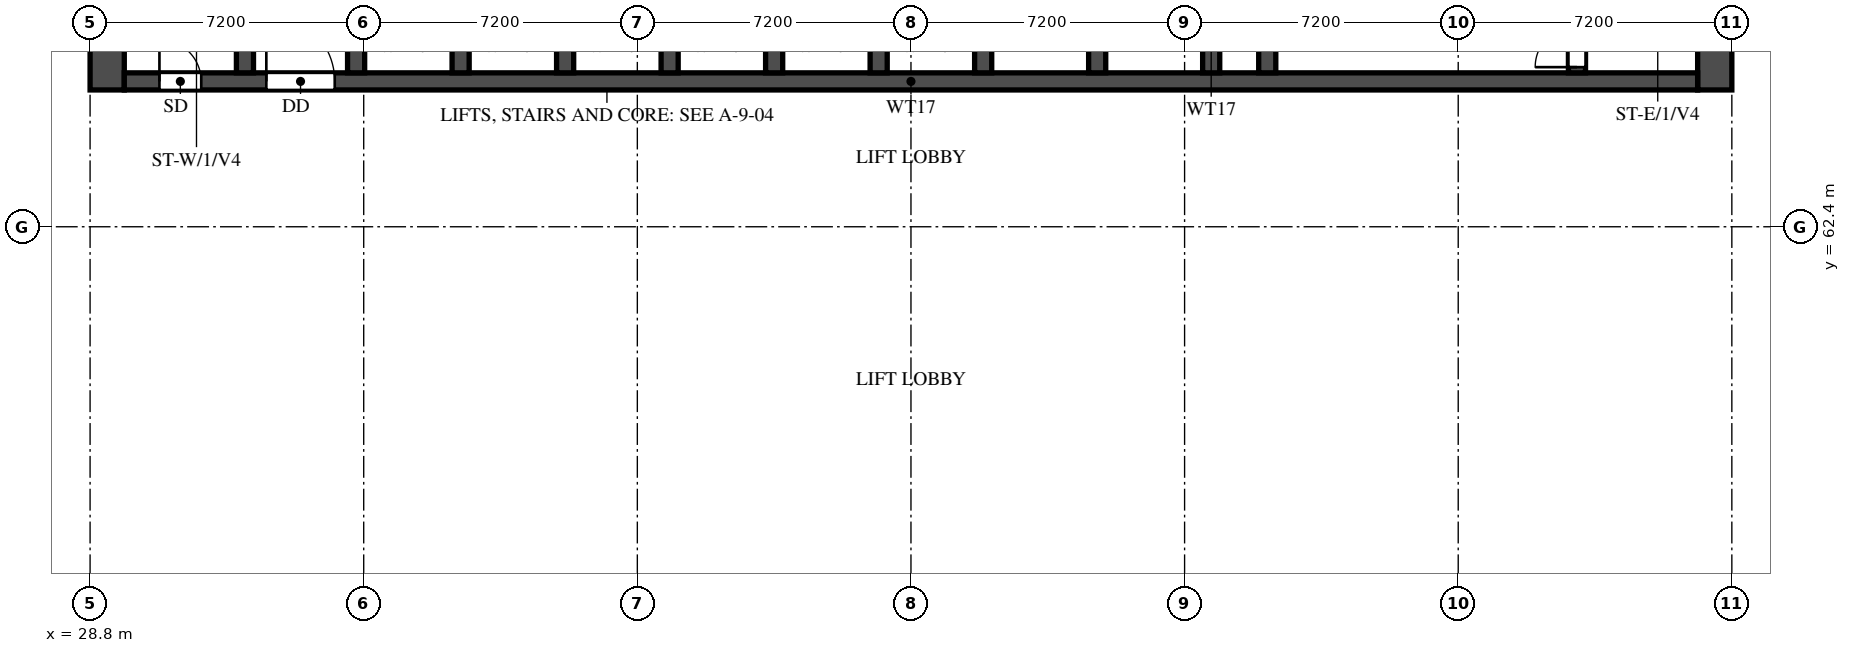
"""IFC4 building model, lengths in metres.
Left out: names, types, materials, properties, quantities, classifications, styles, units other than length and angle.
Written with IfcOpenShell. Run it as: python <this file> out.ifc"""

import sys

from ifc_helpers import new_model, si_unit, direction, frame, frame_2d, origin, place, context, subcontext, project, spatial, rectangle, extrude, element, fill, save


model = new_model("IFC4")
c1 = context("Model", 3, precision=1e-05, world=origin(), true_north=direction((0.0, 1.0)))
c2 = subcontext(c1, "Body", "Model", "MODEL_VIEW")
j1 = project(units=[si_unit("LENGTHUNIT", "METRE"), si_unit("PLANEANGLEUNIT", "RADIAN")], contexts=[c1])
p1 = place(None, origin())
s1 = spatial("IfcSite", under=j1, at=p1, CompositionType="ELEMENT")
p2 = place(p1, origin())
s2 = spatial("IfcBuilding", under=s1, at=p2, CompositionType="ELEMENT")
p3 = place(p2, frame((0.0, 0.0, 13.2)))
s3 = spatial("IfcBuildingStorey", under=s2, at=p3, CompositionType="ELEMENT", Elevation=13.2)
for number, where, z_axis, x_axis in (
    (1, (29.25, 66.0, 0.0), (0.0, 0.0, 1.0), (0.0, 1.0, 0.0)),
    (2, (71.55, 66.0, 0.0), (0.0, 0.0, 1.0), (0.0, 1.0, 0.0)),
):
    element("IfcWall", number, at=place(p3, frame(where, z_axis=z_axis, x_axis=x_axis)), inside=s3, PredefinedType="SHEAR", context=c2, shape_type="SweptSolid", body=[
        extrude(rectangle(XDim=12.0, YDim=0.9, at=frame_2d((6.0, 0.0))), origin(), (0.0, 0.0, 1.0), 3.8),
    ])
p4 = place(p3, frame((29.7, 66.225, 0.0), z_axis=(0.0, 0.0, 1.0), x_axis=(1.0, 0.0, 0.0)))
e3 = element("IfcWall", 3, at=p4, inside=s3, PredefinedType="SHEAR", context=c2, shape_type="SweptSolid", body=[
    extrude(rectangle(XDim=41.4, YDim=0.45, at=frame_2d((20.7, 0.0))), origin(), (0.0, 0.0, 1.0), 3.8),
])
p5 = place(p4, frame((0.925, 0.0, 0.0)))
e4 = element("IfcOpeningElement", 4, at=p5, cuts=e3, PredefinedType="OPENING", context=c2, shape_type="SweptSolid", body=[
    extrude(rectangle(XDim=1.1, YDim=2.1, at=frame_2d((0.55, 1.05))), frame((0.0, 0.235, 0.0), z_axis=(0.0, -1.0, 0.0), x_axis=(1.0, 0.0, 0.0)), (0.0, 0.0, 1.0), 0.47),
])
p6 = place(p4, frame((3.738, 0.0, 0.0)))
e5 = element("IfcOpeningElement", 5, at=p6, cuts=e3, PredefinedType="OPENING", context=c2, shape_type="SweptSolid", body=[
    extrude(rectangle(XDim=1.8, YDim=2.1, at=frame_2d((0.9, 1.05))), frame((0.0, 0.235, 0.0), z_axis=(0.0, -1.0, 0.0), x_axis=(1.0, 0.0, 0.0)), (0.0, 0.0, 1.0), 0.47),
])
p7 = place(p3, frame((32.875, 66.45, 0.0), z_axis=(0.0, 0.0, 1.0), x_axis=(0.0, 1.0, 0.0)))
e6 = element("IfcWall", 6, at=p7, inside=s3, PredefinedType="SHEAR", context=c2, shape_type="SweptSolid", body=[
    extrude(rectangle(XDim=10.65, YDim=0.45, at=frame_2d((5.325, 0.0))), origin(), (0.0, 0.0, 1.0), 3.8),
])
p8 = place(p3, frame((67.925, 66.45, 0.0), z_axis=(0.0, 0.0, 1.0), x_axis=(0.0, 1.0, 0.0)))
e7 = element("IfcWall", 7, at=p8, inside=s3, PredefinedType="SHEAR", context=c2, shape_type="SweptSolid", body=[
    extrude(rectangle(XDim=10.65, YDim=0.45, at=frame_2d((5.325, 0.0))), origin(), (0.0, 0.0, 1.0), 3.8),
])
p9 = place(p8, frame((0.15, 0.0, 0.0)))
e8 = element("IfcOpeningElement", 8, at=p9, cuts=e7, PredefinedType="OPENING", context=c2, shape_type="SweptSolid", body=[
    extrude(rectangle(XDim=1.1, YDim=2.1, at=frame_2d((0.55, 1.05))), frame((0.0, 0.235, 0.0), z_axis=(0.0, -1.0, 0.0), x_axis=(1.0, 0.0, 0.0)), (0.0, 0.0, 1.0), 0.47),
])
p10 = place(p3, frame((59.775, 66.45, 0.0), z_axis=(0.0, 0.0, 1.0), x_axis=(0.0, 1.0, 0.0)))
e9 = element("IfcWall", 9, at=p10, inside=s3, PredefinedType="SHEAR", context=c2, shape_type="SweptSolid", body=[
    extrude(rectangle(XDim=6.025, YDim=0.45, at=frame_2d((3.013, 0.0))), origin(), (0.0, 0.0, 1.0), 3.8),
])
p11 = place(p10, frame((3.85, 0.0, 0.0)))
e10 = element("IfcOpeningElement", 10, at=p11, cuts=e9, PredefinedType="OPENING", context=c2, shape_type="SweptSolid", body=[
    extrude(rectangle(XDim=1.2, YDim=2.1, at=frame_2d((0.6, 1.05))), frame((0.0, 0.235, 0.0), z_axis=(0.0, -1.0, 0.0), x_axis=(1.0, 0.0, 0.0)), (0.0, 0.0, 1.0), 0.47),
])
for number, where, z_axis, x_axis in (
    (11, (35.8, 66.45, 0.0), (0.0, 0.0, 1.0), (0.0, 1.0, 0.0)),
    (12, (38.55, 66.45, 0.0), (0.0, 0.0, 1.0), (0.0, 1.0, 0.0)),
    (13, (41.3, 66.45, 0.0), (0.0, 0.0, 1.0), (0.0, 1.0, 0.0)),
    (14, (44.05, 66.45, 0.0), (0.0, 0.0, 1.0), (0.0, 1.0, 0.0)),
    (15, (46.8, 66.45, 0.0), (0.0, 0.0, 1.0), (0.0, 1.0, 0.0)),
    (16, (49.55, 66.45, 0.0), (0.0, 0.0, 1.0), (0.0, 1.0, 0.0)),
    (17, (52.3, 66.45, 0.0), (0.0, 0.0, 1.0), (0.0, 1.0, 0.0)),
    (18, (55.3, 66.45, 0.0), (0.0, 0.0, 1.0), (0.0, 1.0, 0.0)),
    (19, (58.3, 66.45, 0.0), (0.0, 0.0, 1.0), (0.0, 1.0, 0.0)),
):
    element("IfcWall", number, at=place(p3, frame(where, z_axis=z_axis, x_axis=x_axis)), inside=s3, PredefinedType="SHEAR", context=c2, shape_type="SweptSolid", body=[
        extrude(rectangle(XDim=2.425, YDim=0.45, at=frame_2d((1.212, 0.0))), origin(), (0.0, 0.0, 1.0), 3.8),
    ])
p12 = place(p5, origin())
e20 = element("IfcDoor", 20, at=p12, inside=s3, OperationType="SINGLE_SWING_LEFT", PredefinedType="DOOR", context=c2, shape_type="SweptSolid", body=[
    extrude(rectangle(XDim=1.1, YDim=2.1, at=frame_2d((0.55, 1.05))), frame((0.0, 0.025, 0.0), z_axis=(0.0, -1.0, 0.0), x_axis=(1.0, 0.0, 0.0)), (0.0, 0.0, 1.0), 0.05),
])
fill(e4, e20)
p13 = place(p9, origin())
e21 = element("IfcDoor", 21, at=p13, inside=s3, OperationType="SINGLE_SWING_LEFT", PredefinedType="DOOR", context=c2, shape_type="SweptSolid", body=[
    extrude(rectangle(XDim=1.1, YDim=2.1, at=frame_2d((0.55, 1.05))), frame((0.0, 0.025, 0.0), z_axis=(0.0, -1.0, 0.0), x_axis=(1.0, 0.0, 0.0)), (0.0, 0.0, 1.0), 0.05),
])
fill(e8, e21)
p14 = place(p6, origin())
e22 = element("IfcDoor", 22, at=p14, inside=s3, OperationType="DOUBLE_DOOR_SINGLE_SWING", PredefinedType="DOOR", context=c2, shape_type="SweptSolid", body=[
    extrude(rectangle(XDim=1.8, YDim=2.1, at=frame_2d((0.9, 1.05))), frame((0.0, 0.025, 0.0), z_axis=(0.0, -1.0, 0.0), x_axis=(1.0, 0.0, 0.0)), (0.0, 0.0, 1.0), 0.05),
])
fill(e5, e22)
save(model, sys.argv[1])
